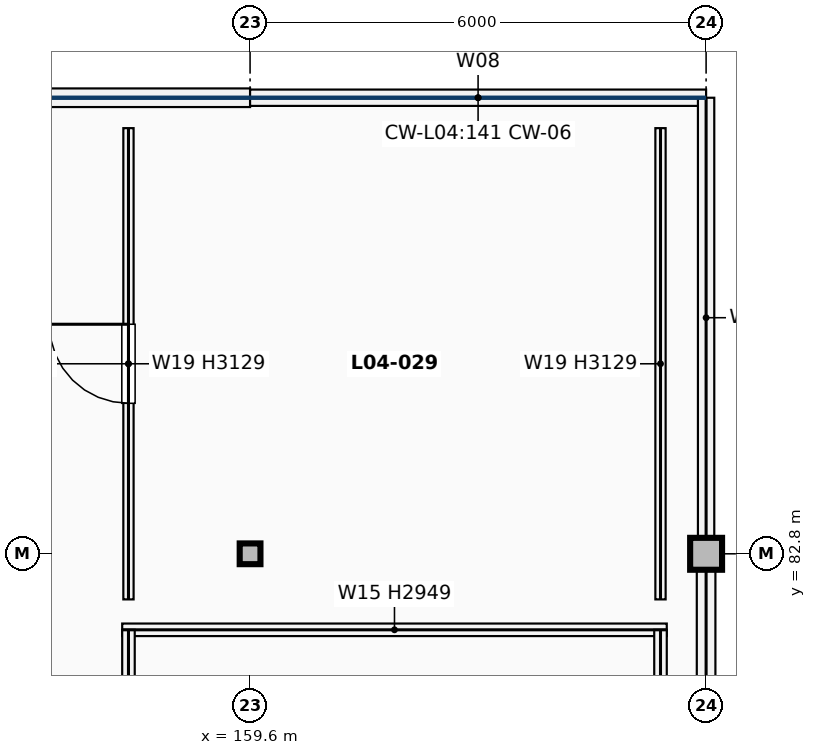
"""IFC4 building model, lengths in metres.
Left out: names, types, materials, properties, quantities, classifications, styles, units other than length and angle.
Written with IfcOpenShell. Run it as: python <this file> out.ifc"""

import sys

from ifc_helpers import new_model, si_unit, direction, frame, frame_2d, origin, origin_2d, place, context, subcontext, project, spatial, rectangle, hollow_circle, extrude, element, fill, save


model = new_model("IFC4")
c1 = context("Model", 3, precision=1e-05, world=origin(), true_north=direction((0.0, 1.0)))
c2 = subcontext(c1, "Body", "Model", "MODEL_VIEW")
j1 = project(units=[si_unit("LENGTHUNIT", "METRE"), si_unit("PLANEANGLEUNIT", "RADIAN")], contexts=[c1])
p1 = place(None, origin())
s1 = spatial("IfcSite", under=j1, at=p1, CompositionType="ELEMENT")
p2 = place(p1, origin())
s2 = spatial("IfcBuilding", under=s1, at=p2, CompositionType="ELEMENT")
p3 = place(p2, frame((0.0, 0.0, 17.34)))
s3 = spatial("IfcBuildingStorey", under=s2, at=p3, CompositionType="ELEMENT", Elevation=17.34)
p4 = place(p3, frame((159.6, 82.8, 0.0), z_axis=(0.0, 0.0, 1.0), x_axis=(1.0, 0.0, 0.0)))
e1 = element("IfcColumn", 1, at=p4, inside=s3, PredefinedType="COLUMN", context=c2, shape_type="SweptSolid", body=[
    extrude(hollow_circle(Radius=0.136, WallThickness=0.012, at=origin_2d()), origin(), (0.0, 0.0, 1.0), 3.7),
])
p5 = place(p3, frame((165.6, 82.8, 0.0), z_axis=(0.0, 0.0, 1.0), x_axis=(1.0, 0.0, 0.0)))
e2 = element("IfcColumn", 2, at=p5, inside=s3, PredefinedType="COLUMN", context=c2, shape_type="SweptSolid", body=[
    extrude(rectangle(XDim=0.42, YDim=0.42, at=origin_2d()), origin(), (0.0, 0.0, 1.0), 3.74),
])
p6 = place(p3, frame((150.0, 88.8, 0.0), z_axis=(0.0, 0.0, 1.0), x_axis=(1.0, 0.0, 0.0)))
e3 = element("IfcWall", 3, at=p6, inside=s3, PredefinedType="SOLIDWALL", context=c2, shape_type="SweptSolid", body=[
    extrude(rectangle(XDim=9.6, YDim=0.245, at=frame_2d((4.8, 0.0))), origin(), (0.0, 0.0, 1.0), 0.85),
])
p7 = place(p3, frame((159.6, 88.8, 0.0), z_axis=(0.0, 0.0, 1.0), x_axis=(1.0, 0.0, 0.0)))
e4 = element("IfcWall", 4, at=p7, inside=s3, PredefinedType="SOLIDWALL", context=c2, shape_type="SweptSolid", body=[
    extrude(rectangle(XDim=6.0, YDim=0.215, at=frame_2d((3.0, 0.0))), origin(), (0.0, 0.0, 1.0), 0.85),
])
p8 = place(p3, frame((165.6, 79.412, 0.0), z_axis=(0.0, 0.0, 1.0), x_axis=(0.0, 1.0, 0.0)))
e5 = element("IfcWall", 5, at=p8, inside=s3, PredefinedType="SOLIDWALL", context=c2, shape_type="SweptSolid", body=[
    extrude(rectangle(XDim=3.176, YDim=0.245, at=frame_2d((1.588, 0.0))), origin(), (0.0, 0.0, 1.0), 2.869),
])
p9 = place(p3, frame((165.6, 83.012, 0.0), z_axis=(0.0, 0.0, 1.0), x_axis=(0.0, 1.0, 0.0)))
e6 = element("IfcWall", 6, at=p9, inside=s3, PredefinedType="SOLIDWALL", context=c2, shape_type="SweptSolid", body=[
    extrude(rectangle(XDim=5.788, YDim=0.215, at=frame_2d((2.894, 0.0))), origin(), (0.0, 0.0, 1.0), 2.979),
])
p10 = place(p3, frame((157.917, 81.8, 0.0), z_axis=(0.0, 0.0, 1.0), x_axis=(1.0, 0.0, 0.0)))
e7 = element("IfcWall", 7, at=p10, inside=s3, PredefinedType="PARTITIONING", context=c2, shape_type="SweptSolid", body=[
    extrude(rectangle(XDim=7.165, YDim=0.165, at=frame_2d((3.583, 0.0))), origin(), (0.0, 0.0, 1.0), 2.949),
])
p11 = place(p3, frame((158.0, 74.4, 0.0), z_axis=(0.0, 0.0, 1.0), x_axis=(0.0, 1.0, 0.0)))
e8 = element("IfcWall", 8, at=p11, inside=s3, PredefinedType="PARTITIONING", context=c2, shape_type="SweptSolid", body=[
    extrude(rectangle(XDim=7.4, YDim=0.165, at=frame_2d((3.7, 0.0))), origin(), (0.0, 0.0, 1.0), 3.029),
])
p12 = place(p11, frame((0.798, 0.0, 0.0)))
e9 = element("IfcOpeningElement", 9, at=p12, cuts=e8, PredefinedType="OPENING", context=c2, shape_type="SweptSolid", body=[
    extrude(rectangle(XDim=1.02, YDim=2.18, at=frame_2d((0.51, 1.09))), frame((0.0, 0.093, 0.0), z_axis=(0.0, -1.0, 0.0), x_axis=(1.0, 0.0, 0.0)), (0.0, 0.0, 1.0), 0.185),
])
p13 = place(p3, frame((165.0, 74.4, 0.0), z_axis=(0.0, 0.0, 1.0), x_axis=(0.0, 1.0, 0.0)))
e10 = element("IfcWall", 10, at=p13, inside=s3, PredefinedType="PARTITIONING", context=c2, shape_type="SweptSolid", body=[
    extrude(rectangle(XDim=7.4, YDim=0.165, at=frame_2d((3.7, 0.0))), origin(), (0.0, 0.0, 1.0), 2.869),
])
p14 = place(p3, frame((158.0, 82.2, 0.0), z_axis=(0.0, 0.0, 1.0), x_axis=(0.0, 1.0, 0.0)))
e11 = element("IfcWall", 11, at=p14, inside=s3, PredefinedType="PARTITIONING", context=c2, shape_type="SweptSolid", body=[
    extrude(rectangle(XDim=6.2, YDim=0.135, at=frame_2d((3.1, 0.0))), origin(), (0.0, 0.0, 1.0), 3.129),
])
p15 = place(p14, frame((2.58, 0.0, 0.0)))
e12 = element("IfcOpeningElement", 12, at=p15, cuts=e11, PredefinedType="OPENING", context=c2, shape_type="SweptSolid", body=[
    extrude(rectangle(XDim=1.04, YDim=2.12, at=frame_2d((0.52, 1.06))), frame((0.0, 0.078, 0.0), z_axis=(0.0, -1.0, 0.0), x_axis=(1.0, 0.0, 0.0)), (0.0, 0.0, 1.0), 0.155),
])
p16 = place(p3, frame((165.0, 82.2, 0.0), z_axis=(0.0, 0.0, 1.0), x_axis=(0.0, 1.0, 0.0)))
e13 = element("IfcWall", 13, at=p16, inside=s3, PredefinedType="PARTITIONING", context=c2, shape_type="SweptSolid", body=[
    extrude(rectangle(XDim=6.2, YDim=0.135, at=frame_2d((3.1, 0.0))), origin(), (0.0, 0.0, 1.0), 3.129),
])
p17 = place(p15, origin())
e14 = element("IfcDoor", 14, at=p17, inside=s3, OperationType="SINGLE_SWING_RIGHT", PredefinedType="DOOR", context=c2, shape_type="SweptSolid", body=[
    extrude(rectangle(XDim=1.04, YDim=2.12, at=frame_2d((0.52, 1.06))), frame((0.0, 0.025, 0.0), z_axis=(0.0, -1.0, 0.0), x_axis=(1.0, 0.0, 0.0)), (0.0, 0.0, 1.0), 0.05),
])
fill(e12, e14)
save(model, sys.argv[1])
